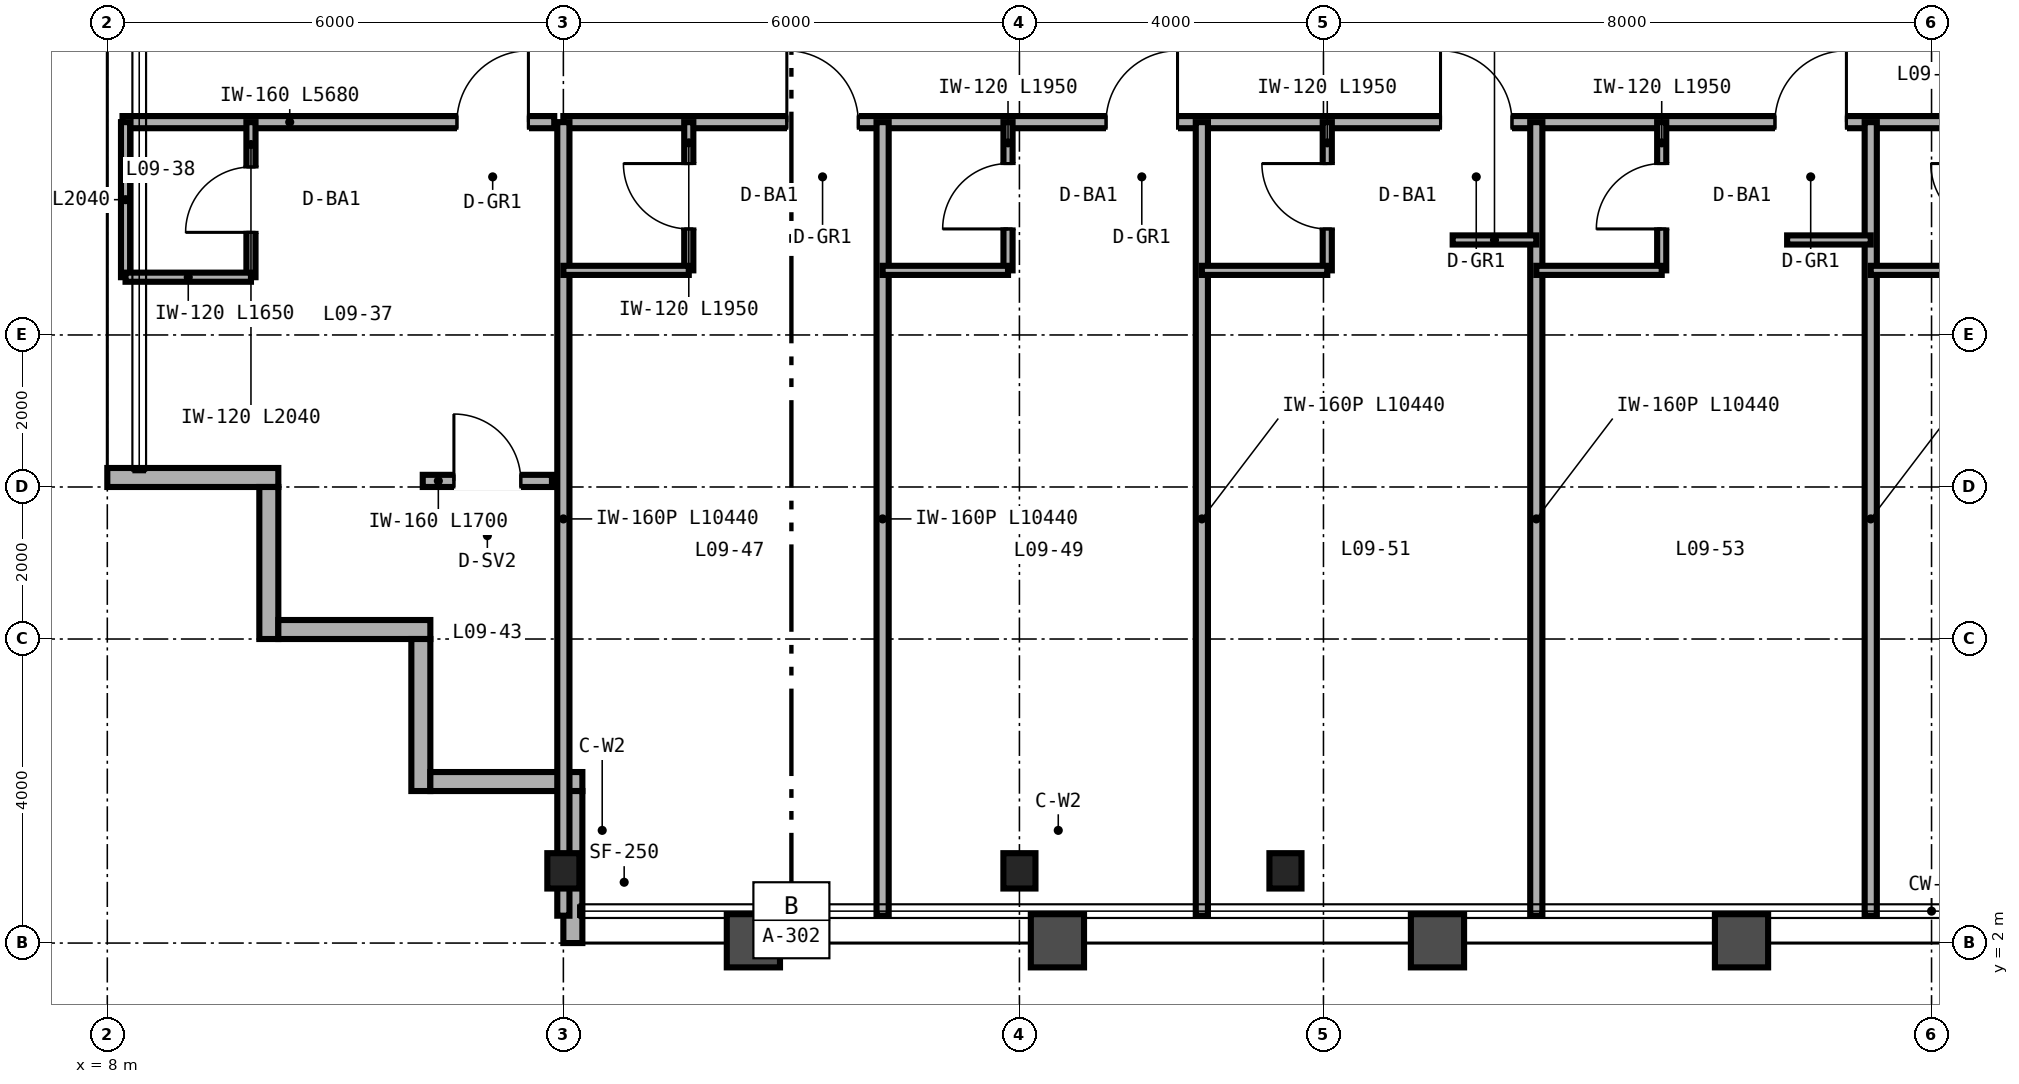
"""IFC4 building model, lengths in metres.
Left out: names, types, materials, properties, quantities, classifications, styles, units other than length and angle.
Written with IfcOpenShell. Run it as: python <this file> out.ifc"""

import sys

from ifc_helpers import new_model, si_unit, direction, frame, frame_2d, origin, origin_2d, place, context, subcontext, project, spatial, rectangle, i_section, extrude, source, transform, mapped, element, fill, save


model = new_model("IFC4")
c1 = context("Model", 3, precision=1e-05, world=origin(), true_north=direction((0.0, 1.0)))
c2 = subcontext(c1, "Body", "Model", "MODEL_VIEW")
j1 = project(units=[si_unit("LENGTHUNIT", "METRE"), si_unit("PLANEANGLEUNIT", "RADIAN")], contexts=[c1])
p1 = place(None, origin())
s1 = spatial("IfcSite", under=j1, at=p1, CompositionType="ELEMENT")
p2 = place(p1, origin())
s2 = spatial("IfcBuilding", under=s1, at=p2, CompositionType="ELEMENT")
p3 = place(p2, frame((0.0, 0.0, 42.0)))
s3 = spatial("IfcBuildingStorey", under=s2, at=p3, CompositionType="ELEMENT", Elevation=42.0)
m1 = source(origin(), c2, "Body", "SweptSolid", [
    extrude(i_section(OverallWidth=0.422, OverallDepth=0.465, WebThickness=0.045, FlangeThickness=0.073, FilletRadius=0.025, at=origin_2d()), origin(), (0.0, 0.0, 1.0), 3.35),
])
for number, where, z_axis, x_axis in (
    (1, (14.0, 2.95, 0.0), (0.0, 0.0, 1.0), (1.0, 0.0, 0.0)),
    (2, (20.0, 2.95, 0.0), (0.0, 0.0, 1.0), (1.0, 0.0, 0.0)),
    (3, (23.5, 2.95, 0.0), (0.0, 0.0, 1.0), (1.0, 0.0, 0.0)),
):
    element("IfcColumn", number, at=place(p3, frame(where, z_axis=z_axis, x_axis=x_axis)), inside=s3, PredefinedType="COLUMN", context=c2, shape_type="MappedRepresentation", body=[
        mapped(m1, transform((0.0, 0.0, 0.0), scale=1.0)),
    ])
p4 = place(p3, frame((8.0, 8.125, 0.0), z_axis=(0.0, 0.0, 1.0), x_axis=(1.0, 0.0, 0.0)))
e4 = element("IfcWall", 4, at=p4, inside=s3, PredefinedType="SOLIDWALL", context=c2, shape_type="SweptSolid", body=[
    extrude(rectangle(XDim=2.25, YDim=0.25, at=frame_2d((1.125, 0.0))), origin(), (0.0, 0.0, 1.0), 3.35),
])
for number, where, z_axis, x_axis in (
    (5, (10.125, 8.0, 0.0), (0.0, 0.0, 1.0), (0.0, -1.0, 0.0)),
    (6, (10.25, 6.125, 0.0), (0.0, 0.0, 1.0), (1.0, 0.0, 0.0)),
    (7, (12.125, 6.0, 0.0), (0.0, 0.0, 1.0), (0.0, -1.0, 0.0)),
    (8, (12.25, 4.125, 0.0), (0.0, 0.0, 1.0), (1.0, 0.0, 0.0)),
):
    element("IfcWall", number, at=place(p3, frame(where, z_axis=z_axis, x_axis=x_axis)), inside=s3, PredefinedType="SOLIDWALL", context=c2, shape_type="SweptSolid", body=[
        extrude(rectangle(XDim=2.0, YDim=0.25, at=frame_2d((1.0, 0.0))), origin(), (0.0, 0.0, 1.0), 3.35),
    ])
p5 = place(p3, frame((14.125, 4.0, 0.0), z_axis=(0.0, 0.0, 1.0), x_axis=(0.0, -1.0, 0.0)))
e9 = element("IfcWall", 9, at=p5, inside=s3, PredefinedType="SOLIDWALL", context=c2, shape_type="SweptSolid", body=[
    extrude(rectangle(XDim=2.0, YDim=0.25, at=frame_2d((1.0, 0.0))), origin(), (0.0, 0.0, 1.0), 2.657),
])
p6 = place(p3, frame((8.2, 12.8, 0.0), z_axis=(0.0, 0.0, 1.0), x_axis=(1.0, 0.0, 0.0)))
e10 = element("IfcWall", 10, at=p6, inside=s3, PredefinedType="PARTITIONING", context=c2, shape_type="SweptSolid", body=[
    extrude(rectangle(XDim=5.68, YDim=0.16, at=frame_2d((2.84, 0.0))), origin(), (0.0, 0.0, 1.0), 3.35),
])
p7 = place(p6, frame((4.4, 0.0, 0.0)))
e11 = element("IfcOpeningElement", 11, at=p7, cuts=e10, PredefinedType="OPENING", context=c2, shape_type="SweptSolid", body=[
    extrude(rectangle(XDim=0.94, YDim=2.15, at=frame_2d((0.47, 1.075))), frame((0.0, 0.09, 0.0), z_axis=(0.0, -1.0, 0.0), x_axis=(1.0, 0.0, 0.0)), (0.0, 0.0, 1.0), 0.18),
])
p8 = place(p3, frame((9.89, 10.76, 0.0), z_axis=(0.0, 0.0, 1.0), x_axis=(0.0, 1.0, 0.0)))
e12 = element("IfcWall", 12, at=p8, inside=s3, PredefinedType="PARTITIONING", context=c2, shape_type="SweptSolid", body=[
    extrude(rectangle(XDim=2.04, YDim=0.12, at=frame_2d((1.02, 0.0))), origin(), (0.0, 0.0, 1.0), 3.35),
])
p9 = place(p8, frame((0.59, 0.0, 0.0)))
e13 = element("IfcOpeningElement", 13, at=p9, cuts=e12, PredefinedType="OPENING", context=c2, shape_type="SweptSolid", body=[
    extrude(rectangle(XDim=0.86, YDim=2.1, at=frame_2d((0.43, 1.05))), frame((0.0, 0.07, 0.0), z_axis=(0.0, -1.0, 0.0), x_axis=(1.0, 0.0, 0.0)), (0.0, 0.0, 1.0), 0.14),
])
p10 = place(p3, frame((8.24, 10.76, 0.0), z_axis=(0.0, 0.0, 1.0), x_axis=(0.0, 1.0, 0.0)))
e14 = element("IfcWall", 14, at=p10, inside=s3, PredefinedType="PARTITIONING", context=c2, shape_type="SweptSolid", body=[
    extrude(rectangle(XDim=2.04, YDim=0.12, at=frame_2d((1.02, 0.0))), origin(), (0.0, 0.0, 1.0), 3.35),
])
p11 = place(p3, frame((8.24, 10.76, 0.0), z_axis=(0.0, 0.0, 1.0), x_axis=(1.0, 0.0, 0.0)))
e15 = element("IfcWall", 15, at=p11, inside=s3, PredefinedType="PARTITIONING", context=c2, shape_type="SweptSolid", body=[
    extrude(rectangle(XDim=1.65, YDim=0.12, at=frame_2d((0.825, 0.0))), origin(), (0.0, 0.0, 1.0), 3.35),
])
p12 = place(p3, frame((12.15, 8.08, 0.0), z_axis=(0.0, 0.0, 1.0), x_axis=(1.0, 0.0, 0.0)))
e16 = element("IfcWall", 16, at=p12, inside=s3, PredefinedType="PARTITIONING", context=c2, shape_type="SweptSolid", body=[
    extrude(rectangle(XDim=1.7, YDim=0.16, at=frame_2d((0.85, 0.0))), origin(), (0.0, 0.0, 1.0), 3.35),
])
p13 = place(p12, frame((0.41, 0.0, 0.0)))
e17 = element("IfcOpeningElement", 17, at=p13, cuts=e16, PredefinedType="OPENING", context=c2, shape_type="SweptSolid", body=[
    extrude(rectangle(XDim=0.88, YDim=2.15, at=frame_2d((0.44, 1.075))), frame((0.0, 0.09, 0.0), z_axis=(0.0, -1.0, 0.0), x_axis=(1.0, 0.0, 0.0)), (0.0, 0.0, 1.0), 0.18),
])
p14 = place(p3, frame((14.0, 12.8, 0.0), z_axis=(0.0, 0.0, 1.0), x_axis=(1.0, 0.0, 0.0)))
e18 = element("IfcWall", 18, at=p14, inside=s3, PredefinedType="PARTITIONING", context=c2, shape_type="SweptSolid", body=[
    extrude(rectangle(XDim=36.0, YDim=0.16, at=frame_2d((18.0, 0.0))), origin(), (0.0, 0.0, 1.0), 2.571),
])
p15 = place(p14, frame((2.94, 0.0, 0.0)))
e19 = element("IfcOpeningElement", 19, at=p15, cuts=e18, PredefinedType="OPENING", context=c2, shape_type="SweptSolid", body=[
    extrude(rectangle(XDim=0.94, YDim=2.15, at=frame_2d((0.47, 1.075))), frame((0.0, 0.09, 0.0), z_axis=(0.0, -1.0, 0.0), x_axis=(1.0, 0.0, 0.0)), (0.0, 0.0, 1.0), 0.18),
])
p16 = place(p14, frame((7.14, 0.0, 0.0)))
e20 = element("IfcOpeningElement", 20, at=p16, cuts=e18, PredefinedType="OPENING", context=c2, shape_type="SweptSolid", body=[
    extrude(rectangle(XDim=0.94, YDim=2.15, at=frame_2d((0.47, 1.075))), frame((0.0, 0.09, 0.0), z_axis=(0.0, -1.0, 0.0), x_axis=(1.0, 0.0, 0.0)), (0.0, 0.0, 1.0), 0.18),
])
p17 = place(p14, frame((11.54, 0.0, 0.0)))
e21 = element("IfcOpeningElement", 21, at=p17, cuts=e18, PredefinedType="OPENING", context=c2, shape_type="SweptSolid", body=[
    extrude(rectangle(XDim=0.94, YDim=2.15, at=frame_2d((0.47, 1.075))), frame((0.0, 0.09, 0.0), z_axis=(0.0, -1.0, 0.0), x_axis=(1.0, 0.0, 0.0)), (0.0, 0.0, 1.0), 0.18),
])
p18 = place(p14, frame((15.94, 0.0, 0.0)))
e22 = element("IfcOpeningElement", 22, at=p18, cuts=e18, PredefinedType="OPENING", context=c2, shape_type="SweptSolid", body=[
    extrude(rectangle(XDim=0.94, YDim=2.15, at=frame_2d((0.47, 1.075))), frame((0.0, 0.09, 0.0), z_axis=(0.0, -1.0, 0.0), x_axis=(1.0, 0.0, 0.0)), (0.0, 0.0, 1.0), 0.18),
])
p19 = place(p14, frame((20.54, 0.0, 0.0)))
e23 = element("IfcOpeningElement", 23, at=p19, cuts=e18, PredefinedType="OPENING", context=c2, shape_type="SweptSolid", body=[
    extrude(rectangle(XDim=0.94, YDim=2.15, at=frame_2d((0.47, 1.075))), frame((0.0, 0.09, 0.0), z_axis=(0.0, -1.0, 0.0), x_axis=(1.0, 0.0, 0.0)), (0.0, 0.0, 1.0), 0.18),
])
p20 = place(p14, frame((24.84, 0.0, 0.0)))
e24 = element("IfcOpeningElement", 24, at=p20, cuts=e18, PredefinedType="OPENING", context=c2, shape_type="SweptSolid", body=[
    extrude(rectangle(XDim=0.94, YDim=2.15, at=frame_2d((0.47, 1.075))), frame((0.0, 0.09, 0.0), z_axis=(0.0, -1.0, 0.0), x_axis=(1.0, 0.0, 0.0)), (0.0, 0.0, 1.0), 0.18),
])
p21 = place(p14, frame((29.94, 0.0, 0.0)))
e25 = element("IfcOpeningElement", 25, at=p21, cuts=e18, PredefinedType="OPENING", context=c2, shape_type="SweptSolid", body=[
    extrude(rectangle(XDim=0.94, YDim=2.15, at=frame_2d((0.47, 1.075))), frame((0.0, 0.09, 0.0), z_axis=(0.0, -1.0, 0.0), x_axis=(1.0, 0.0, 0.0)), (0.0, 0.0, 1.0), 0.18),
])
p22 = place(p14, frame((34.74, 0.0, 0.0)))
e26 = element("IfcOpeningElement", 26, at=p22, cuts=e18, PredefinedType="OPENING", context=c2, shape_type="SweptSolid", body=[
    extrude(rectangle(XDim=0.94, YDim=2.15, at=frame_2d((0.47, 1.075))), frame((0.0, 0.09, 0.0), z_axis=(0.0, -1.0, 0.0), x_axis=(1.0, 0.0, 0.0)), (0.0, 0.0, 1.0), 0.18),
])
for number, where, z_axis, x_axis in (
    (27, (14.0, 2.36, 0.0), (0.0, 0.0, 1.0), (0.0, 1.0, 0.0)),
    (28, (18.2, 2.36, 0.0), (0.0, 0.0, 1.0), (0.0, 1.0, 0.0)),
):
    element("IfcWall", number, at=place(p3, frame(where, z_axis=z_axis, x_axis=x_axis)), inside=s3, PredefinedType="PARTITIONING", context=c2, shape_type="SweptSolid", body=[
        extrude(rectangle(XDim=10.44, YDim=0.16, at=frame_2d((5.22, 0.0))), origin(), (0.0, 0.0, 1.0), 2.657),
    ])
p23 = place(p3, frame((15.65, 10.85, 0.0), z_axis=(0.0, 0.0, 1.0), x_axis=(0.0, 1.0, 0.0)))
e29 = element("IfcWall", 29, at=p23, inside=s3, PredefinedType="PARTITIONING", context=c2, shape_type="SweptSolid", body=[
    extrude(rectangle(XDim=1.95, YDim=0.12, at=frame_2d((0.975, 0.0))), origin(), (0.0, 0.0, 1.0), 3.35),
])
p24 = place(p23, frame((0.545, 0.0, 0.0)))
e30 = element("IfcOpeningElement", 30, at=p24, cuts=e29, PredefinedType="OPENING", context=c2, shape_type="SweptSolid", body=[
    extrude(rectangle(XDim=0.86, YDim=2.1, at=frame_2d((0.43, 1.05))), frame((0.0, 0.07, 0.0), z_axis=(0.0, -1.0, 0.0), x_axis=(1.0, 0.0, 0.0)), (0.0, 0.0, 1.0), 0.14),
])
p25 = place(p3, frame((14.0, 10.85, 0.0), z_axis=(0.0, 0.0, 1.0), x_axis=(1.0, 0.0, 0.0)))
e31 = element("IfcWall", 31, at=p25, inside=s3, PredefinedType="PARTITIONING", context=c2, shape_type="SweptSolid", body=[
    extrude(rectangle(XDim=1.65, YDim=0.12, at=frame_2d((0.825, 0.0))), origin(), (0.0, 0.0, 1.0), 3.35),
])
p26 = place(p3, frame((22.4, 2.36, 0.0), z_axis=(0.0, 0.0, 1.0), x_axis=(0.0, 1.0, 0.0)))
e32 = element("IfcWall", 32, at=p26, inside=s3, PredefinedType="PARTITIONING", context=c2, shape_type="SweptSolid", body=[
    extrude(rectangle(XDim=10.44, YDim=0.16, at=frame_2d((5.22, 0.0))), origin(), (0.0, 0.0, 1.0), 2.813),
])
p27 = place(p3, frame((19.85, 10.85, 0.0), z_axis=(0.0, 0.0, 1.0), x_axis=(0.0, 1.0, 0.0)))
e33 = element("IfcWall", 33, at=p27, inside=s3, PredefinedType="PARTITIONING", context=c2, shape_type="SweptSolid", body=[
    extrude(rectangle(XDim=1.95, YDim=0.12, at=frame_2d((0.975, 0.0))), origin(), (0.0, 0.0, 1.0), 3.35),
])
p28 = place(p27, frame((0.545, 0.0, 0.0)))
e34 = element("IfcOpeningElement", 34, at=p28, cuts=e33, PredefinedType="OPENING", context=c2, shape_type="SweptSolid", body=[
    extrude(rectangle(XDim=0.86, YDim=2.1, at=frame_2d((0.43, 1.05))), frame((0.0, 0.07, 0.0), z_axis=(0.0, -1.0, 0.0), x_axis=(1.0, 0.0, 0.0)), (0.0, 0.0, 1.0), 0.14),
])
p29 = place(p3, frame((18.2, 10.85, 0.0), z_axis=(0.0, 0.0, 1.0), x_axis=(1.0, 0.0, 0.0)))
e35 = element("IfcWall", 35, at=p29, inside=s3, PredefinedType="PARTITIONING", context=c2, shape_type="SweptSolid", body=[
    extrude(rectangle(XDim=1.65, YDim=0.12, at=frame_2d((0.825, 0.0))), origin(), (0.0, 0.0, 1.0), 3.35),
])
p30 = place(p3, frame((26.8, 2.36, 0.0), z_axis=(0.0, 0.0, 1.0), x_axis=(0.0, 1.0, 0.0)))
e36 = element("IfcWall", 36, at=p30, inside=s3, PredefinedType="PARTITIONING", context=c2, shape_type="SweptSolid", body=[
    extrude(rectangle(XDim=10.44, YDim=0.16, at=frame_2d((5.22, 0.0))), origin(), (0.0, 0.0, 1.0), 2.423),
])
p31 = place(p3, frame((24.05, 10.85, 0.0), z_axis=(0.0, 0.0, 1.0), x_axis=(0.0, 1.0, 0.0)))
e37 = element("IfcWall", 37, at=p31, inside=s3, PredefinedType="PARTITIONING", context=c2, shape_type="SweptSolid", body=[
    extrude(rectangle(XDim=1.95, YDim=0.12, at=frame_2d((0.975, 0.0))), origin(), (0.0, 0.0, 1.0), 3.35),
])
p32 = place(p31, frame((0.545, 0.0, 0.0)))
e38 = element("IfcOpeningElement", 38, at=p32, cuts=e37, PredefinedType="OPENING", context=c2, shape_type="SweptSolid", body=[
    extrude(rectangle(XDim=0.86, YDim=2.1, at=frame_2d((0.43, 1.05))), frame((0.0, 0.07, 0.0), z_axis=(0.0, -1.0, 0.0), x_axis=(1.0, 0.0, 0.0)), (0.0, 0.0, 1.0), 0.14),
])
p33 = place(p3, frame((22.4, 10.85, 0.0), z_axis=(0.0, 0.0, 1.0), x_axis=(1.0, 0.0, 0.0)))
e39 = element("IfcWall", 39, at=p33, inside=s3, PredefinedType="PARTITIONING", context=c2, shape_type="SweptSolid", body=[
    extrude(rectangle(XDim=1.65, YDim=0.12, at=frame_2d((0.825, 0.0))), origin(), (0.0, 0.0, 1.0), 2.571),
])
p34 = place(p3, frame((25.7, 11.25, 0.0), z_axis=(0.0, 0.0, 1.0), x_axis=(1.0, 0.0, 0.0)))
e40 = element("IfcWall", 40, at=p34, inside=s3, PredefinedType="PARTITIONING", context=c2, shape_type="SweptSolid", body=[
    extrude(rectangle(XDim=1.1, YDim=0.12, at=frame_2d((0.55, 0.0))), origin(), (0.0, 0.0, 1.0), 3.35),
])
p35 = place(p3, frame((31.2, 2.36, 0.0), z_axis=(0.0, 0.0, 1.0), x_axis=(0.0, 1.0, 0.0)))
e41 = element("IfcWall", 41, at=p35, inside=s3, PredefinedType="PARTITIONING", context=c2, shape_type="SweptSolid", body=[
    extrude(rectangle(XDim=10.44, YDim=0.16, at=frame_2d((5.22, 0.0))), origin(), (0.0, 0.0, 1.0), 2.423),
])
p36 = place(p3, frame((28.45, 10.85, 0.0), z_axis=(0.0, 0.0, 1.0), x_axis=(0.0, 1.0, 0.0)))
e42 = element("IfcWall", 42, at=p36, inside=s3, PredefinedType="PARTITIONING", context=c2, shape_type="SweptSolid", body=[
    extrude(rectangle(XDim=1.95, YDim=0.12, at=frame_2d((0.975, 0.0))), origin(), (0.0, 0.0, 1.0), 3.35),
])
p37 = place(p36, frame((0.545, 0.0, 0.0)))
e43 = element("IfcOpeningElement", 43, at=p37, cuts=e42, PredefinedType="OPENING", context=c2, shape_type="SweptSolid", body=[
    extrude(rectangle(XDim=0.86, YDim=2.1, at=frame_2d((0.43, 1.05))), frame((0.0, 0.07, 0.0), z_axis=(0.0, -1.0, 0.0), x_axis=(1.0, 0.0, 0.0)), (0.0, 0.0, 1.0), 0.14),
])
p38 = place(p3, frame((26.8, 10.85, 0.0), z_axis=(0.0, 0.0, 1.0), x_axis=(1.0, 0.0, 0.0)))
e44 = element("IfcWall", 44, at=p38, inside=s3, PredefinedType="PARTITIONING", context=c2, shape_type="SweptSolid", body=[
    extrude(rectangle(XDim=1.65, YDim=0.12, at=frame_2d((0.825, 0.0))), origin(), (0.0, 0.0, 1.0), 3.35),
])
p39 = place(p3, frame((30.1, 11.25, 0.0), z_axis=(0.0, 0.0, 1.0), x_axis=(1.0, 0.0, 0.0)))
e45 = element("IfcWall", 45, at=p39, inside=s3, PredefinedType="PARTITIONING", context=c2, shape_type="SweptSolid", body=[
    extrude(rectangle(XDim=1.1, YDim=0.12, at=frame_2d((0.55, 0.0))), origin(), (0.0, 0.0, 1.0), 3.35),
])
p40 = place(p3, frame((31.2, 10.85, 0.0), z_axis=(0.0, 0.0, 1.0), x_axis=(1.0, 0.0, 0.0)))
e46 = element("IfcWall", 46, at=p40, inside=s3, PredefinedType="PARTITIONING", context=c2, shape_type="SweptSolid", body=[
    extrude(rectangle(XDim=1.65, YDim=0.12, at=frame_2d((0.825, 0.0))), origin(), (0.0, 0.0, 1.0), 3.35),
])
m2 = source(origin(), c2, "Body", "SweptSolid", [
    extrude(rectangle(XDim=0.86, YDim=2.1, at=frame_2d((0.43, 1.05))), frame((0.0, 0.025, 0.0), z_axis=(0.0, -1.0, 0.0), x_axis=(1.0, 0.0, 0.0)), (0.0, 0.0, 1.0), 0.05),
])
p41 = place(p9, origin())
e47 = element("IfcDoor", 47, at=p41, inside=s3, OperationType="SINGLE_SWING_LEFT", PredefinedType="DOOR", context=c2, shape_type="MappedRepresentation", body=[
    mapped(m2, transform((0.0, 0.0, 0.0), scale=1.0)),
])
fill(e13, e47)
m3 = source(origin(), c2, "Body", "SweptSolid", [
    extrude(rectangle(XDim=0.94, YDim=2.15, at=frame_2d((0.47, 1.075))), frame((0.0, 0.025, 0.0), z_axis=(0.0, -1.0, 0.0), x_axis=(1.0, 0.0, 0.0)), (0.0, 0.0, 1.0), 0.05),
])
p42 = place(p7, origin())
e48 = element("IfcDoor", 48, at=p42, inside=s3, OperationType="SINGLE_SWING_RIGHT", PredefinedType="DOOR", context=c2, shape_type="MappedRepresentation", body=[
    mapped(m3, transform((0.0, 0.0, 0.0), scale=1.0)),
])
fill(e11, e48)
m4 = source(origin(), c2, "Body", "SweptSolid", [
    extrude(rectangle(XDim=0.88, YDim=2.15, at=frame_2d((0.44, 1.075))), frame((0.0, 0.025, 0.0), z_axis=(0.0, -1.0, 0.0), x_axis=(1.0, 0.0, 0.0)), (0.0, 0.0, 1.0), 0.05),
])
p43 = place(p13, origin())
e49 = element("IfcDoor", 49, at=p43, inside=s3, OperationType="SINGLE_SWING_LEFT", PredefinedType="DOOR", context=c2, shape_type="MappedRepresentation", body=[
    mapped(m4, transform((0.0, 0.0, 0.0), scale=1.0)),
])
fill(e17, e49)
p44 = place(p24, origin())
e50 = element("IfcDoor", 50, at=p44, inside=s3, OperationType="SINGLE_SWING_RIGHT", PredefinedType="DOOR", context=c2, shape_type="MappedRepresentation", body=[
    mapped(m2, transform((0.0, 0.0, 0.0), scale=1.0)),
])
fill(e30, e50)
p45 = place(p28, origin())
e51 = element("IfcDoor", 51, at=p45, inside=s3, OperationType="SINGLE_SWING_LEFT", PredefinedType="DOOR", context=c2, shape_type="MappedRepresentation", body=[
    mapped(m2, transform((0.0, 0.0, 0.0), scale=1.0)),
])
fill(e34, e51)
p46 = place(p32, origin())
e52 = element("IfcDoor", 52, at=p46, inside=s3, OperationType="SINGLE_SWING_RIGHT", PredefinedType="DOOR", context=c2, shape_type="MappedRepresentation", body=[
    mapped(m2, transform((0.0, 0.0, 0.0), scale=1.0)),
])
fill(e38, e52)
p47 = place(p37, origin())
e53 = element("IfcDoor", 53, at=p47, inside=s3, OperationType="SINGLE_SWING_LEFT", PredefinedType="DOOR", context=c2, shape_type="MappedRepresentation", body=[
    mapped(m2, transform((0.0, 0.0, 0.0), scale=1.0)),
])
fill(e43, e53)
p48 = place(p15, origin())
e54 = element("IfcDoor", 54, at=p48, inside=s3, OperationType="SINGLE_SWING_LEFT", PredefinedType="DOOR", context=c2, shape_type="MappedRepresentation", body=[
    mapped(m3, transform((0.0, 0.0, 0.0), scale=1.0)),
])
fill(e19, e54)
p49 = place(p16, origin())
e55 = element("IfcDoor", 55, at=p49, inside=s3, OperationType="SINGLE_SWING_RIGHT", PredefinedType="DOOR", context=c2, shape_type="MappedRepresentation", body=[
    mapped(m3, transform((0.0, 0.0, 0.0), scale=1.0)),
])
fill(e20, e55)
p50 = place(p17, origin())
e56 = element("IfcDoor", 56, at=p50, inside=s3, OperationType="SINGLE_SWING_LEFT", PredefinedType="DOOR", context=c2, shape_type="MappedRepresentation", body=[
    mapped(m3, transform((0.0, 0.0, 0.0), scale=1.0)),
])
fill(e21, e56)
p51 = place(p18, origin())
e57 = element("IfcDoor", 57, at=p51, inside=s3, OperationType="SINGLE_SWING_RIGHT", PredefinedType="DOOR", context=c2, shape_type="MappedRepresentation", body=[
    mapped(m3, transform((0.0, 0.0, 0.0), scale=1.0)),
])
fill(e22, e57)
save(model, sys.argv[1])
